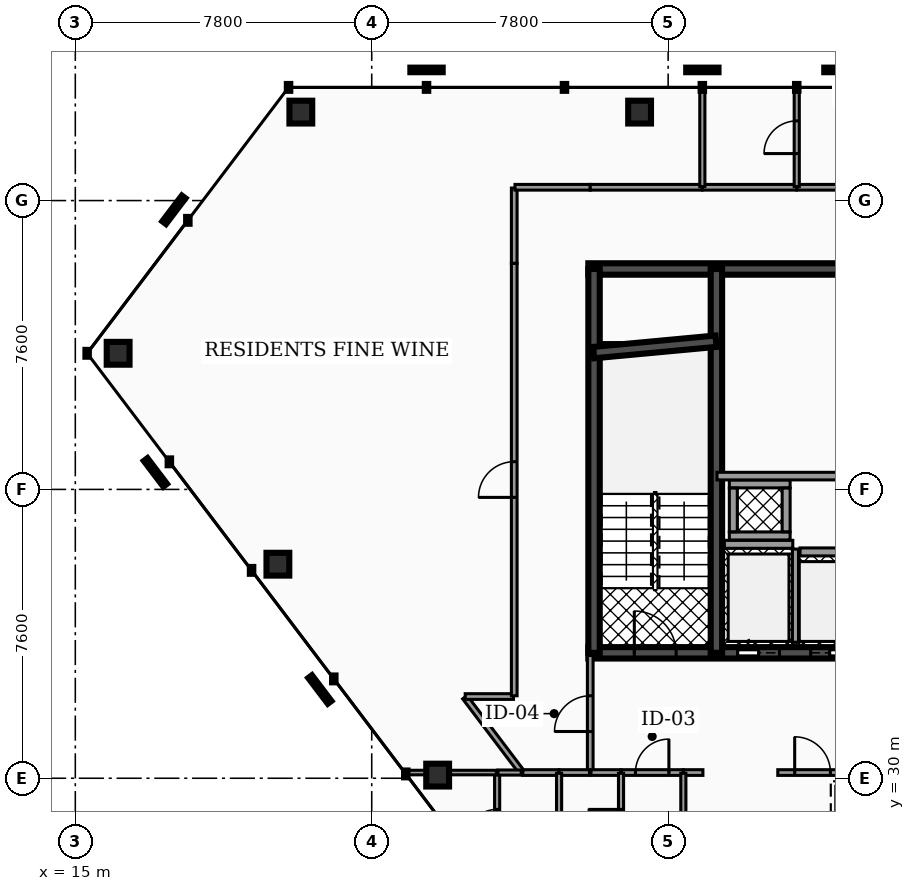
"""IFC4 building model, lengths in metres.
Left out: names, types, materials, properties, quantities, classifications, styles, units other than length and angle.
Written with IfcOpenShell. Run it as: python <this file> out.ifc"""

import sys

from ifc_helpers import new_model, si_unit, direction, frame, frame_2d, origin, origin_2d, place, context, subcontext, project, spatial, rectangle, hollow_rectangle, extrude, element, fill, save


model = new_model("IFC4")
c1 = context("Model", 3, precision=1e-05, world=origin(), true_north=direction((0.0, 1.0)))
c2 = subcontext(c1, "Body", "Model", "MODEL_VIEW")
j1 = project(units=[si_unit("LENGTHUNIT", "METRE"), si_unit("PLANEANGLEUNIT", "RADIAN")], contexts=[c1])
p1 = place(None, origin())
s1 = spatial("IfcSite", under=j1, at=p1, CompositionType="ELEMENT")
p2 = place(p1, origin())
s2 = spatial("IfcBuilding", under=s1, at=p2, CompositionType="ELEMENT")
p3 = place(p2, frame((0.0, 0.0, 229.16)))
s3 = spatial("IfcBuildingStorey", under=s2, at=p3, CompositionType="ELEMENT", Elevation=229.16)
p4 = place(p3, frame((28.5, 43.4, 0.0), z_axis=(0.0, 0.0, 1.0), x_axis=(1.0, 0.0, 0.0)))
e1 = element("IfcWall", 1, at=p4, inside=s3, PredefinedType="SHEAR", context=c2, shape_type="SweptSolid", body=[
    extrude(rectangle(XDim=19.86, YDim=0.3, at=frame_2d((9.93, 0.0))), origin(), (0.0, 0.0, 1.0), 3.18),
])
p5 = place(p3, frame((28.5, 33.3, 0.0), z_axis=(0.0, 0.0, 1.0), x_axis=(1.0, 0.0, 0.0)))
e2 = element("IfcWall", 2, at=p5, inside=s3, PredefinedType="SHEAR", context=c2, shape_type="SweptSolid", body=[
    extrude(rectangle(XDim=19.86, YDim=0.3, at=frame_2d((9.93, 0.0))), origin(), (0.0, 0.0, 1.0), 3.18),
])
p6 = place(p5, frame((3.93, 0.0, 0.0)))
e3 = element("IfcOpeningElement", 3, at=p6, cuts=e2, PredefinedType="OPENING", context=c2, shape_type="SweptSolid", body=[
    extrude(rectangle(XDim=1.1, YDim=2.15, at=frame_2d((0.55, 1.075))), frame((0.0, 0.16, 0.0), z_axis=(0.0, -1.0, 0.0), x_axis=(1.0, 0.0, 0.0)), (0.0, 0.0, 1.0), 0.32),
])
p7 = place(p5, frame((14.77, 0.0, 0.0)))
e4 = element("IfcOpeningElement", 4, at=p7, cuts=e2, PredefinedType="OPENING", context=c2, shape_type="SweptSolid", body=[
    extrude(rectangle(XDim=1.1, YDim=2.15, at=frame_2d((0.55, 1.075))), frame((0.0, 0.16, 0.0), z_axis=(0.0, -1.0, 0.0), x_axis=(1.0, 0.0, 0.0)), (0.0, 0.0, 1.0), 0.32),
])
p8 = place(p5, frame((11.25, 0.0, 0.0)))
e5 = element("IfcOpeningElement", 5, at=p8, cuts=e2, PredefinedType="OPENING", context=c2, shape_type="SweptSolid", body=[
    extrude(rectangle(XDim=1.0, YDim=2.1, at=frame_2d((0.5, 1.05))), frame((0.0, 0.16, 0.0), z_axis=(0.0, -1.0, 0.0), x_axis=(1.0, 0.0, 0.0)), (0.0, 0.0, 1.0), 0.32),
])
p9 = place(p5, frame((12.95, 0.0, 0.0)))
e6 = element("IfcOpeningElement", 6, at=p9, cuts=e2, PredefinedType="OPENING", context=c2, shape_type="SweptSolid", body=[
    extrude(rectangle(XDim=1.0, YDim=2.1, at=frame_2d((0.5, 1.05))), frame((0.0, 0.16, 0.0), z_axis=(0.0, -1.0, 0.0), x_axis=(1.0, 0.0, 0.0)), (0.0, 0.0, 1.0), 0.32),
])
p10 = place(p5, frame((5.85, 0.0, 0.0)))
e7 = element("IfcOpeningElement", 7, at=p10, cuts=e2, PredefinedType="OPENING", context=c2, shape_type="SweptSolid", body=[
    extrude(rectangle(XDim=1.0, YDim=2.1, at=frame_2d((0.5, 1.05))), frame((0.0, 0.16, 0.0), z_axis=(0.0, -1.0, 0.0), x_axis=(1.0, 0.0, 0.0)), (0.0, 0.0, 1.0), 0.32),
])
p11 = place(p5, frame((1.21, 0.0, 0.0)))
e8 = element("IfcOpeningElement", 8, at=p11, cuts=e2, PredefinedType="OPENING", context=c2, shape_type="SweptSolid", body=[
    extrude(rectangle(XDim=1.1, YDim=2.2, at=frame_2d((0.55, 1.1))), frame((0.0, 0.16, 0.0), z_axis=(0.0, -1.0, 0.0), x_axis=(1.0, 0.0, 0.0)), (0.0, 0.0, 1.0), 0.32),
])
p12 = place(p5, frame((9.34, 0.0, 0.0)))
e9 = element("IfcOpeningElement", 9, at=p12, cuts=e2, PredefinedType="OPENING", context=c2, shape_type="SweptSolid", body=[
    extrude(rectangle(XDim=1.12, YDim=2.05, at=frame_2d((0.56, 1.025))), frame((0.0, 0.16, 0.0), z_axis=(0.0, -1.0, 0.0), x_axis=(1.0, 0.0, 0.0)), (0.0, 0.0, 1.0), 0.32),
])
p13 = place(p5, frame((17.55, 0.0, 0.0)))
e10 = element("IfcOpeningElement", 10, at=p13, cuts=e2, PredefinedType="OPENING", context=c2, shape_type="SweptSolid", body=[
    extrude(rectangle(XDim=1.1, YDim=2.2, at=frame_2d((0.55, 1.1))), frame((0.0, 0.16, 0.0), z_axis=(0.0, -1.0, 0.0), x_axis=(1.0, 0.0, 0.0)), (0.0, 0.0, 1.0), 0.32),
])
for number, where, z_axis, x_axis in (
    (11, (28.65, 33.3, 0.0), (0.0, 0.0, 1.0), (0.0, 1.0, 0.0)),
    (12, (31.87, 33.3, 0.0), (0.0, 0.0, 1.0), (0.0, 1.0, 0.0)),
):
    element("IfcWall", number, at=place(p3, frame(where, z_axis=z_axis, x_axis=x_axis)), inside=s3, PredefinedType="SHEAR", context=c2, shape_type="SweptSolid", body=[
        extrude(rectangle(XDim=10.1, YDim=0.3, at=frame_2d((5.05, 0.0))), origin(), (0.0, 0.0, 1.0), 3.18),
    ])
p14 = place(p3, frame((28.64, 41.2, 0.0), z_axis=(0.0, 0.0, 1.0), x_axis=(0.995687118776, 0.092774789157, 0.0)))
e13 = element("IfcWall", 13, at=p14, inside=s3, PredefinedType="SHEAR", context=c2, shape_type="SweptSolid", body=[
    extrude(rectangle(XDim=3.234, YDim=0.3, at=frame_2d((1.617, 0.0))), origin(), (0.0, 0.0, 1.0), 3.18),
])
for number, where, z_axis, x_axis in (
    (14, (29.849, 47.528, 0.0), (0.0, 0.0, 1.0), (1.0, 0.0, 0.0)),
    (15, (20.935, 47.528, 0.0), (0.0, 0.0, 1.0), (1.0, 0.0, 0.0)),
    (16, (16.127, 41.181, 0.0), (0.0, 0.0, 1.0), (1.0, 0.0, 0.0)),
    (17, (20.331, 35.632, 0.0), (0.0, 0.0, 1.0), (1.0, 0.0, 0.0)),
    (18, (24.535, 30.083, 0.0), (0.0, 0.0, 1.0), (1.0, 0.0, 0.0)),
):
    element("IfcColumn", number, at=place(p3, frame(where, z_axis=z_axis, x_axis=x_axis)), inside=s3, PredefinedType="COLUMN", context=c2, shape_type="SweptSolid", body=[
        extrude(hollow_rectangle(XDim=0.6, YDim=0.6, WallThickness=0.03, at=origin_2d()), origin(), (0.0, 0.0, 1.0), 3.18),
    ])
p15 = place(p3, frame((32.08, 36.155, 0.0), z_axis=(0.0, 0.0, 1.0), x_axis=(1.0, 0.0, 0.0)))
e19 = element("IfcWall", 19, at=p15, inside=s3, PredefinedType="SOLIDWALL", context=c2, shape_type="SweptSolid", body=[
    extrude(rectangle(XDim=1.8, YDim=0.21, at=frame_2d((0.9, 0.0))), origin(), (0.0, 0.0, 1.0), 3.18),
])
p16 = place(p3, frame((33.95, 33.58, 0.0), z_axis=(0.0, 0.0, 1.0), x_axis=(0.0, 1.0, 0.0)))
e20 = element("IfcWall", 20, at=p16, inside=s3, PredefinedType="SOLIDWALL", context=c2, shape_type="SweptSolid", body=[
    extrude(rectangle(XDim=2.45, YDim=0.16, at=frame_2d((1.225, 0.0))), origin(), (0.0, 0.0, 1.0), 3.18),
])
p17 = place(p3, frame((34.07, 35.955, 0.0), z_axis=(0.0, 0.0, 1.0), x_axis=(1.0, 0.0, 0.0)))
e21 = element("IfcWall", 21, at=p17, inside=s3, PredefinedType="SOLIDWALL", context=c2, shape_type="SweptSolid", body=[
    extrude(rectangle(XDim=1.56, YDim=0.21, at=frame_2d((0.78, 0.0))), origin(), (0.0, 0.0, 1.0), 3.18),
])
for number, where, z_axis, x_axis in (
    (22, (32.21, 36.375, 0.0), (0.0, 0.0, 1.0), (1.0, 0.0, 0.0)),
    (23, (32.21, 37.745, 0.0), (0.0, 0.0, 1.0), (1.0, 0.0, 0.0)),
):
    element("IfcWall", number, at=place(p3, frame(where, z_axis=z_axis, x_axis=x_axis)), inside=s3, PredefinedType="SOLIDWALL", context=c2, shape_type="SweptSolid", body=[
        extrude(rectangle(XDim=1.6, YDim=0.21, at=frame_2d((0.8, 0.0))), origin(), (0.0, 0.0, 1.0), 3.18),
    ])
for number, where, z_axis, x_axis in (
    (24, (32.315, 36.485, 0.0), (0.0, 0.0, 1.0), (0.0, 1.0, 0.0)),
    (25, (33.705, 36.485, 0.0), (0.0, 0.0, 1.0), (0.0, 1.0, 0.0)),
):
    element("IfcWall", number, at=place(p3, frame(where, z_axis=z_axis, x_axis=x_axis)), inside=s3, PredefinedType="SOLIDWALL", context=c2, shape_type="SweptSolid", body=[
        extrude(rectangle(XDim=1.15, YDim=0.21, at=frame_2d((0.575, 0.0))), origin(), (0.0, 0.0, 1.0), 3.18),
    ])
p18 = place(p3, frame((31.885, 37.95, 0.0), z_axis=(0.0, 0.0, 1.0), x_axis=(1.0, 0.0, 0.0)))
e26 = element("IfcWall", 26, at=p18, inside=s3, PredefinedType="PARTITIONING", context=c2, shape_type="SweptSolid", body=[
    extrude(rectangle(XDim=3.895, YDim=0.2, at=frame_2d((1.948, 0.0))), origin(), (0.0, 0.0, 1.0), 2.235),
])
p19 = place(p3, frame((28.55, 30.17, 0.0), z_axis=(0.0, 0.0, 1.0), x_axis=(0.0, 1.0, 0.0)))
e27 = element("IfcWall", 27, at=p19, inside=s3, PredefinedType="PARTITIONING", context=c2, shape_type="SweptSolid", body=[
    extrude(rectangle(XDim=3.06, YDim=0.15, at=frame_2d((1.53, 0.0))), origin(), (0.0, 0.0, 1.0), 2.235),
])
p20 = place(p19, frame((1.06, 0.0, 0.0)))
e28 = element("IfcOpeningElement", 28, at=p20, cuts=e27, PredefinedType="OPENING", context=c2, shape_type="SweptSolid", body=[
    extrude(rectangle(XDim=0.94, YDim=2.05, at=frame_2d((0.47, 1.025))), frame((0.0, 0.085, 0.0), z_axis=(0.0, -1.0, 0.0), x_axis=(1.0, 0.0, 0.0)), (0.0, 0.0, 1.0), 0.17),
])
p21 = place(p3, frame((29.365, 30.15, 0.0), z_axis=(0.0, 0.0, 1.0), x_axis=(1.0, 0.0, 0.0)))
e29 = element("IfcWall", 29, at=p21, inside=s3, PredefinedType="PARTITIONING", context=c2, shape_type="SweptSolid", body=[
    extrude(rectangle(XDim=1.63, YDim=0.15, at=frame_2d((0.815, 0.0))), origin(), (0.0, 0.0, 1.0), 2.235),
])
p22 = place(p21, frame((0.375, 0.0, 0.0)))
e30 = element("IfcOpeningElement", 30, at=p22, cuts=e29, PredefinedType="OPENING", context=c2, shape_type="SweptSolid", body=[
    extrude(rectangle(XDim=0.88, YDim=2.05, at=frame_2d((0.44, 1.025))), frame((0.0, 0.085, 0.0), z_axis=(0.0, -1.0, 0.0), x_axis=(1.0, 0.0, 0.0)), (0.0, 0.0, 1.0), 0.17),
])
p23 = place(p3, frame((28.57, 30.15, 0.0), z_axis=(0.0, 0.0, 1.0), x_axis=(1.0, 0.0, 0.0)))
e31 = element("IfcWall", 31, at=p23, inside=s3, PredefinedType="PARTITIONING", context=c2, shape_type="SweptSolid", body=[
    extrude(rectangle(XDim=0.785, YDim=0.15, at=frame_2d((0.393, 0.0))), origin(), (0.0, 0.0, 1.0), 2.235),
])
p24 = place(p3, frame((33.485, 30.15, 0.0), z_axis=(0.0, 0.0, 1.0), x_axis=(1.0, 0.0, 0.0)))
e32 = element("IfcWall", 32, at=p24, inside=s3, PredefinedType="PARTITIONING", context=c2, shape_type="SweptSolid", body=[
    extrude(rectangle(XDim=9.83, YDim=0.15, at=frame_2d((4.915, 0.0))), origin(), (0.0, 0.0, 1.0), 2.235),
])
p25 = place(p24, frame((0.445, 0.0, 0.0)))
e33 = element("IfcOpeningElement", 33, at=p25, cuts=e32, PredefinedType="OPENING", context=c2, shape_type="SweptSolid", body=[
    extrude(rectangle(XDim=0.94, YDim=2.05, at=frame_2d((0.47, 1.025))), frame((0.0, 0.085, 0.0), z_axis=(0.0, -1.0, 0.0), x_axis=(1.0, 0.0, 0.0)), (0.0, 0.0, 1.0), 0.17),
])
p26 = place(p3, frame((31.005, 30.15, 0.0), z_axis=(0.0, 0.0, 1.0), x_axis=(1.0, 0.0, 0.0)))
e34 = element("IfcWall", 34, at=p26, inside=s3, PredefinedType="PARTITIONING", context=c2, shape_type="SweptSolid", body=[
    extrude(rectangle(XDim=0.51, YDim=0.15, at=frame_2d((0.255, 0.0))), origin(), (0.0, 0.0, 1.0), 2.235),
])
p27 = place(p3, frame((26.775, 30.15, 0.0), z_axis=(0.0, 0.0, 1.0), x_axis=(1.0, 0.0, 0.0)))
e35 = element("IfcWall", 35, at=p27, inside=s3, PredefinedType="PARTITIONING", context=c2, shape_type="SweptSolid", body=[
    extrude(rectangle(XDim=0.95, YDim=0.15, at=frame_2d((0.475, 0.0))), origin(), (0.0, 0.0, 1.0), 2.235),
])
p28 = place(p3, frame((27.735, 30.15, 0.0), z_axis=(0.0, 0.0, 1.0), x_axis=(1.0, 0.0, 0.0)))
e36 = element("IfcWall", 36, at=p28, inside=s3, PredefinedType="PARTITIONING", context=c2, shape_type="SweptSolid", body=[
    extrude(rectangle(XDim=0.795, YDim=0.15, at=frame_2d((0.397, 0.0))), origin(), (0.0, 0.0, 1.0), 2.235),
])
p29 = place(p3, frame((25.252, 32.134, 0.0), z_axis=(0.0, 0.0, 1.0), x_axis=(0.603869110647, -0.797083494502, 0.0)))
e37 = element("IfcWall", 37, at=p29, inside=s3, PredefinedType="PARTITIONING", context=c2, shape_type="SweptSolid", body=[
    extrude(rectangle(XDim=2.469, YDim=0.15, at=frame_2d((1.234, 0.0))), origin(), (0.0, 0.0, 1.0), 2.235),
])
p30 = place(p3, frame((25.26, 32.15, 0.0), z_axis=(0.0, 0.0, 1.0), x_axis=(1.0, 0.0, 0.0)))
e38 = element("IfcWall", 38, at=p30, inside=s3, PredefinedType="PARTITIONING", context=c2, shape_type="SweptSolid", body=[
    extrude(rectangle(XDim=1.271, YDim=0.15, at=frame_2d((0.635, 0.0))), origin(), (0.0, 0.0, 1.0), 2.235),
])
p31 = place(p3, frame((26.55, 32.17, 0.0), z_axis=(0.0, 0.0, 1.0), x_axis=(0.0, 1.0, 0.0)))
e39 = element("IfcWall", 39, at=p31, inside=s3, PredefinedType="PARTITIONING", context=c2, shape_type="SweptSolid", body=[
    extrude(rectangle(XDim=11.38, YDim=0.15, at=frame_2d((5.69, 0.0))), origin(), (0.0, 0.0, 1.0), 2.235),
])
p32 = place(p31, frame((5.22, 0.0, 0.0)))
e40 = element("IfcOpeningElement", 40, at=p32, cuts=e39, PredefinedType="OPENING", context=c2, shape_type="SweptSolid", body=[
    extrude(rectangle(XDim=0.94, YDim=2.05, at=frame_2d((0.47, 1.025))), frame((0.0, 0.085, 0.0), z_axis=(0.0, -1.0, 0.0), x_axis=(1.0, 0.0, 0.0)), (0.0, 0.0, 1.0), 0.17),
])
for number, where, z_axis, x_axis in (
    (41, (26.55, 43.55, 0.0), (0.0, 0.0, 1.0), (0.0, 1.0, 0.0)),
    (42, (26.57, 45.55, 0.0), (0.0, 0.0, 1.0), (1.0, 0.0, 0.0)),
):
    element("IfcWall", number, at=place(p3, frame(where, z_axis=z_axis, x_axis=x_axis)), inside=s3, PredefinedType="PARTITIONING", context=c2, shape_type="SweptSolid", body=[
        extrude(rectangle(XDim=1.98, YDim=0.15, at=frame_2d((0.99, 0.0))), origin(), (0.0, 0.0, 1.0), 2.235),
    ])
p33 = place(p3, frame((28.55, 45.55, 0.0), z_axis=(0.0, 0.0, 1.0), x_axis=(1.0, 0.0, 0.0)))
e43 = element("IfcWall", 43, at=p33, inside=s3, PredefinedType="PARTITIONING", context=c2, shape_type="SweptSolid", body=[
    extrude(rectangle(XDim=2.945, YDim=0.15, at=frame_2d((1.473, 0.0))), origin(), (0.0, 0.0, 1.0), 2.235),
])
p34 = place(p3, frame((33.989, 45.55, 0.0), z_axis=(0.0, 0.0, 1.0), x_axis=(1.0, 0.0, 0.0)))
e44 = element("IfcWall", 44, at=p34, inside=s3, PredefinedType="PARTITIONING", context=c2, shape_type="SweptSolid", body=[
    extrude(rectangle(XDim=6.78, YDim=0.15, at=frame_2d((3.39, 0.0))), origin(), (0.0, 0.0, 1.0), 2.235),
])
p35 = place(p34, frame((2.92, 0.0, 0.0)))
e45 = element("IfcOpeningElement", 45, at=p35, cuts=e44, PredefinedType="OPENING", context=c2, shape_type="SweptSolid", body=[
    extrude(rectangle(XDim=0.94, YDim=2.05, at=frame_2d((0.47, 1.025))), frame((0.0, 0.085, 0.0), z_axis=(0.0, -1.0, 0.0), x_axis=(1.0, 0.0, 0.0)), (0.0, 0.0, 1.0), 0.17),
])
p36 = place(p3, frame((31.505, 45.55, 0.0), z_axis=(0.0, 0.0, 1.0), x_axis=(1.0, 0.0, 0.0)))
e46 = element("IfcWall", 46, at=p36, inside=s3, PredefinedType="PARTITIONING", context=c2, shape_type="SweptSolid", body=[
    extrude(rectangle(XDim=2.474, YDim=0.15, at=frame_2d((1.237, 0.0))), origin(), (0.0, 0.0, 1.0), 2.235),
])
p37 = place(p3, frame((29.36, 27.37, 0.0), z_axis=(0.0, 0.0, 1.0), x_axis=(0.0, 1.0, 0.0)))
e47 = element("IfcWall", 47, at=p37, inside=s3, PredefinedType="PARTITIONING", context=c2, shape_type="SweptSolid", body=[
    extrude(rectangle(XDim=2.76, YDim=0.135, at=frame_2d((1.38, 0.0))), origin(), (0.0, 0.0, 1.0), 2.235),
])
p38 = place(p37, frame((0.95, 0.0, 0.0)))
e48 = element("IfcOpeningElement", 48, at=p38, cuts=e47, PredefinedType="OPENING", context=c2, shape_type="SweptSolid", body=[
    extrude(rectangle(XDim=0.86, YDim=2.05, at=frame_2d((0.43, 1.025))), frame((0.0, 0.077, 0.0), z_axis=(0.0, -1.0, 0.0), x_axis=(1.0, 0.0, 0.0)), (0.0, 0.0, 1.0), 0.155),
])
for number, where, z_axis, x_axis in (
    (49, (31.0, 27.37, 0.0), (0.0, 0.0, 1.0), (0.0, 1.0, 0.0)),
    (50, (27.73, 27.37, 0.0), (0.0, 0.0, 1.0), (0.0, 1.0, 0.0)),
):
    element("IfcWall", number, at=place(p3, frame(where, z_axis=z_axis, x_axis=x_axis)), inside=s3, PredefinedType="PARTITIONING", context=c2, shape_type="SweptSolid", body=[
        extrude(rectangle(XDim=2.76, YDim=0.135, at=frame_2d((1.38, 0.0))), origin(), (0.0, 0.0, 1.0), 2.235),
    ])
p39 = place(p3, frame((26.1, 27.37, 0.0), z_axis=(0.0, 0.0, 1.0), x_axis=(0.0, 1.0, 0.0)))
e51 = element("IfcWall", 51, at=p39, inside=s3, PredefinedType="PARTITIONING", context=c2, shape_type="SweptSolid", body=[
    extrude(rectangle(XDim=2.76, YDim=0.135, at=frame_2d((1.38, 0.0))), origin(), (0.0, 0.0, 1.0), 2.235),
])
p40 = place(p39, frame((0.95, 0.0, 0.0)))
e52 = element("IfcOpeningElement", 52, at=p40, cuts=e51, PredefinedType="OPENING", context=c2, shape_type="SweptSolid", body=[
    extrude(rectangle(XDim=0.86, YDim=2.05, at=frame_2d((0.43, 1.025))), frame((0.0, 0.077, 0.0), z_axis=(0.0, -1.0, 0.0), x_axis=(1.0, 0.0, 0.0)), (0.0, 0.0, 1.0), 0.155),
])
p41 = place(p3, frame((26.12, 30.15, 0.0), z_axis=(0.0, 0.0, 1.0), x_axis=(1.0, 0.0, 0.0)))
e53 = element("IfcWall", 53, at=p41, inside=s3, PredefinedType="PARTITIONING", context=c2, shape_type="SweptSolid", body=[
    extrude(rectangle(XDim=0.615, YDim=0.135, at=frame_2d((0.307, 0.0))), origin(), (0.0, 0.0, 1.0), 2.235),
])
p42 = place(p3, frame((23.684, 30.15, 0.0), z_axis=(0.0, 0.0, 1.0), x_axis=(1.0, 0.0, 0.0)))
e54 = element("IfcWall", 54, at=p42, inside=s3, PredefinedType="PARTITIONING", context=c2, shape_type="SweptSolid", body=[
    extrude(rectangle(XDim=0.562, YDim=0.12, at=frame_2d((0.281, 0.0))), origin(), (0.0, 0.0, 1.0), 2.235),
])
p43 = place(p3, frame((24.754, 30.15, 0.0), z_axis=(0.0, 0.0, 1.0), x_axis=(1.0, 0.0, 0.0)))
e55 = element("IfcWall", 55, at=p43, inside=s3, PredefinedType="PARTITIONING", context=c2, shape_type="SweptSolid", body=[
    extrude(rectangle(XDim=1.326, YDim=0.12, at=frame_2d((0.663, 0.0))), origin(), (0.0, 0.0, 1.0), 2.235),
])
p44 = place(p3, frame((31.5, 45.57, 0.0), z_axis=(0.0, 0.0, 1.0), x_axis=(0.0, 1.0, 0.0)))
e56 = element("IfcWall", 56, at=p44, inside=s3, PredefinedType="PARTITIONING", context=c2, shape_type="SweptSolid", body=[
    extrude(rectangle(XDim=2.593, YDim=0.135, at=frame_2d((1.296, 0.0))), origin(), (0.0, 0.0, 1.0), 2.235),
])
p45 = place(p3, frame((33.984, 45.57, 0.0), z_axis=(0.0, 0.0, 1.0), x_axis=(0.0, 1.0, 0.0)))
e57 = element("IfcWall", 57, at=p45, inside=s3, PredefinedType="PARTITIONING", context=c2, shape_type="SweptSolid", body=[
    extrude(rectangle(XDim=2.593, YDim=0.135, at=frame_2d((1.296, 0.0))), origin(), (0.0, 0.0, 1.0), 2.235),
])
p46 = place(p45, frame((0.866, 0.0, 0.0)))
e58 = element("IfcOpeningElement", 58, at=p46, cuts=e57, PredefinedType="OPENING", context=c2, shape_type="SweptSolid", body=[
    extrude(rectangle(XDim=0.86, YDim=2.05, at=frame_2d((0.43, 1.025))), frame((0.0, 0.077, 0.0), z_axis=(0.0, -1.0, 0.0), x_axis=(1.0, 0.0, 0.0)), (0.0, 0.0, 1.0), 0.155),
])
p47 = place(p6, origin())
e59 = element("IfcDoor", 59, at=p47, inside=s3, OperationType="SLIDING_TO_LEFT", PredefinedType="DOOR", context=c2, shape_type="SweptSolid", body=[
    extrude(rectangle(XDim=1.1, YDim=2.15, at=frame_2d((0.55, 1.075))), frame((0.0, 0.025, 0.0), z_axis=(0.0, -1.0, 0.0), x_axis=(1.0, 0.0, 0.0)), (0.0, 0.0, 1.0), 0.05),
])
fill(e3, e59)
p48 = place(p10, origin())
e60 = element("IfcDoor", 60, at=p48, inside=s3, OperationType="SLIDING_TO_RIGHT", PredefinedType="DOOR", context=c2, shape_type="SweptSolid", body=[
    extrude(rectangle(XDim=1.0, YDim=2.1, at=frame_2d((0.5, 1.05))), frame((0.0, 0.025, 0.0), z_axis=(0.0, -1.0, 0.0), x_axis=(1.0, 0.0, 0.0)), (0.0, 0.0, 1.0), 0.05),
])
fill(e7, e60)
p49 = place(p11, origin())
e61 = element("IfcDoor", 61, at=p49, inside=s3, OperationType="SINGLE_SWING_LEFT", PredefinedType="DOOR", context=c2, shape_type="SweptSolid", body=[
    extrude(rectangle(XDim=1.1, YDim=2.2, at=frame_2d((0.55, 1.1))), frame((0.0, 0.025, 0.0), z_axis=(0.0, -1.0, 0.0), x_axis=(1.0, 0.0, 0.0)), (0.0, 0.0, 1.0), 0.05),
])
fill(e8, e61)
p50 = place(p20, origin())
e62 = element("IfcDoor", 62, at=p50, inside=s3, OperationType="SINGLE_SWING_LEFT", PredefinedType="DOOR", context=c2, shape_type="SweptSolid", body=[
    extrude(rectangle(XDim=0.94, YDim=2.05, at=frame_2d((0.47, 1.025))), frame((0.0, 0.025, 0.0), z_axis=(0.0, -1.0, 0.0), x_axis=(1.0, 0.0, 0.0)), (0.0, 0.0, 1.0), 0.05),
])
fill(e28, e62)
p51 = place(p22, origin())
e63 = element("IfcDoor", 63, at=p51, inside=s3, OperationType="SINGLE_SWING_RIGHT", PredefinedType="DOOR", context=c2, shape_type="SweptSolid", body=[
    extrude(rectangle(XDim=0.88, YDim=2.05, at=frame_2d((0.44, 1.025))), frame((0.0, 0.025, 0.0), z_axis=(0.0, -1.0, 0.0), x_axis=(1.0, 0.0, 0.0)), (0.0, 0.0, 1.0), 0.05),
])
fill(e30, e63)
p52 = place(p25, origin())
e64 = element("IfcDoor", 64, at=p52, inside=s3, OperationType="SINGLE_SWING_LEFT", PredefinedType="DOOR", context=c2, shape_type="SweptSolid", body=[
    extrude(rectangle(XDim=0.94, YDim=2.05, at=frame_2d((0.47, 1.025))), frame((0.0, 0.025, 0.0), z_axis=(0.0, -1.0, 0.0), x_axis=(1.0, 0.0, 0.0)), (0.0, 0.0, 1.0), 0.05),
])
fill(e33, e64)
p53 = place(p32, origin())
e65 = element("IfcDoor", 65, at=p53, inside=s3, OperationType="SINGLE_SWING_LEFT", PredefinedType="DOOR", context=c2, shape_type="SweptSolid", body=[
    extrude(rectangle(XDim=0.94, YDim=2.05, at=frame_2d((0.47, 1.025))), frame((0.0, 0.025, 0.0), z_axis=(0.0, -1.0, 0.0), x_axis=(1.0, 0.0, 0.0)), (0.0, 0.0, 1.0), 0.05),
])
fill(e40, e65)
p54 = place(p38, origin())
e66 = element("IfcDoor", 66, at=p54, inside=s3, OperationType="SINGLE_SWING_RIGHT", PredefinedType="DOOR", context=c2, shape_type="SweptSolid", body=[
    extrude(rectangle(XDim=0.86, YDim=2.05, at=frame_2d((0.43, 1.025))), frame((0.0, 0.025, 0.0), z_axis=(0.0, -1.0, 0.0), x_axis=(1.0, 0.0, 0.0)), (0.0, 0.0, 1.0), 0.05),
])
fill(e48, e66)
p55 = place(p40, origin())
e67 = element("IfcDoor", 67, at=p55, inside=s3, OperationType="SINGLE_SWING_LEFT", PredefinedType="DOOR", context=c2, shape_type="SweptSolid", body=[
    extrude(rectangle(XDim=0.86, YDim=2.05, at=frame_2d((0.43, 1.025))), frame((0.0, 0.025, 0.0), z_axis=(0.0, -1.0, 0.0), x_axis=(1.0, 0.0, 0.0)), (0.0, 0.0, 1.0), 0.05),
])
fill(e52, e67)
p56 = place(p46, origin())
e68 = element("IfcDoor", 68, at=p56, inside=s3, OperationType="SINGLE_SWING_LEFT", PredefinedType="DOOR", context=c2, shape_type="SweptSolid", body=[
    extrude(rectangle(XDim=0.86, YDim=2.05, at=frame_2d((0.43, 1.025))), frame((0.0, 0.025, 0.0), z_axis=(0.0, -1.0, 0.0), x_axis=(1.0, 0.0, 0.0)), (0.0, 0.0, 1.0), 0.05),
])
fill(e58, e68)
save(model, sys.argv[1])
